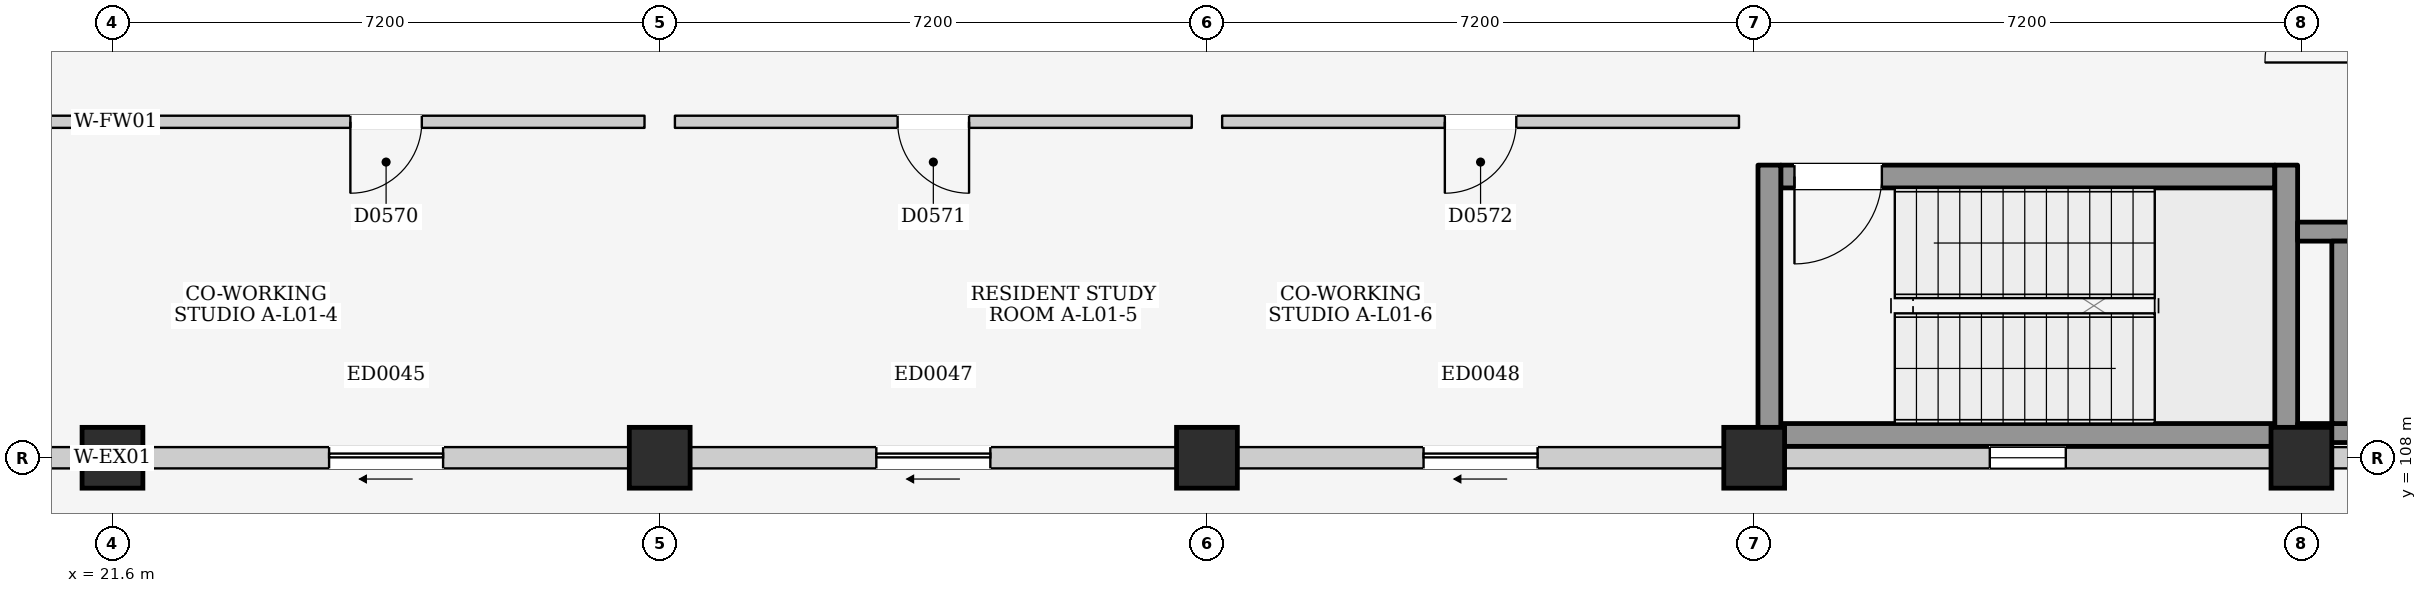
"""IFC4 building model, lengths in metres.
Left out: names, types, materials, properties, quantities, classifications, styles, units other than length and angle.
Written with IfcOpenShell. Run it as: python <this file> out.ifc"""

import sys

from ifc_helpers import new_model, si_unit, direction, frame, frame_2d, origin, origin_2d, place, context, subcontext, project, spatial, rectangle, extrude, element, fill, save


model = new_model("IFC4")
c1 = context("Model", 3, precision=1e-05, world=origin(), true_north=direction((0.0, 1.0)))
c2 = subcontext(c1, "Body", "Model", "MODEL_VIEW")
j1 = project(units=[si_unit("LENGTHUNIT", "METRE"), si_unit("PLANEANGLEUNIT", "RADIAN")], contexts=[c1])
p1 = place(None, origin())
s1 = spatial("IfcSite", under=j1, at=p1, CompositionType="ELEMENT")
p2 = place(p1, origin())
s2 = spatial("IfcBuilding", under=s1, at=p2, CompositionType="ELEMENT")
p3 = place(p2, frame((0.0, 0.0, 4.5)))
s3 = spatial("IfcBuildingStorey", under=s2, at=p3, CompositionType="ELEMENT", Elevation=4.5)
for number, where, z_axis, x_axis in (
    (1, (21.6, 108.0, 0.0), (0.0, 0.0, 1.0), (1.0, 0.0, 0.0)),
    (2, (28.8, 108.0, 0.0), (0.0, 0.0, 1.0), (1.0, 0.0, 0.0)),
    (3, (36.0, 108.0, 0.0), (0.0, 0.0, 1.0), (1.0, 0.0, 0.0)),
    (4, (43.2, 108.0, 0.0), (0.0, 0.0, 1.0), (1.0, 0.0, 0.0)),
    (5, (50.4, 108.0, 0.0), (0.0, 0.0, 1.0), (1.0, 0.0, 0.0)),
):
    element("IfcColumn", number, at=place(p3, frame(where, z_axis=z_axis, x_axis=x_axis)), inside=s3, PredefinedType="COLUMN", context=c2, shape_type="SweptSolid", body=[
        extrude(rectangle(XDim=0.8, YDim=0.8, at=origin_2d()), origin(), (0.0, 0.0, 1.0), 4.5),
    ])
p4 = place(p3, frame((14.8, 108.0, 0.0), z_axis=(0.0, 0.0, 1.0), x_axis=(1.0, 0.0, 0.0)))
e6 = element("IfcWall", 6, at=p4, inside=s3, PredefinedType="ELEMENTEDWALL", context=c2, shape_type="SweptSolid", body=[
    extrude(rectangle(XDim=6.4, YDim=0.28, at=frame_2d((3.2, 0.0))), origin(), (0.0, 0.0, 1.0), 3.585),
])
p5 = place(p4, frame((2.45, 0.0, 0.0)))
e7 = element("IfcOpeningElement", 7, at=p5, cuts=e6, PredefinedType="OPENING", context=c2, shape_type="SweptSolid", body=[
    extrude(rectangle(XDim=1.5, YDim=2.12, at=frame_2d((0.75, 1.06))), frame((0.0, 0.155, 0.0), z_axis=(0.0, -1.0, 0.0), x_axis=(1.0, 0.0, 0.0)), (0.0, 0.0, 1.0), 0.31),
])
p6 = place(p3, frame((22.0, 108.0, 0.0), z_axis=(0.0, 0.0, 1.0), x_axis=(1.0, 0.0, 0.0)))
e8 = element("IfcWall", 8, at=p6, inside=s3, PredefinedType="ELEMENTEDWALL", context=c2, shape_type="SweptSolid", body=[
    extrude(rectangle(XDim=6.4, YDim=0.28, at=frame_2d((3.2, 0.0))), origin(), (0.0, 0.0, 1.0), 3.585),
])
p7 = place(p6, frame((2.45, 0.0, 0.0)))
e9 = element("IfcOpeningElement", 9, at=p7, cuts=e8, PredefinedType="OPENING", context=c2, shape_type="SweptSolid", body=[
    extrude(rectangle(XDim=1.5, YDim=2.12, at=frame_2d((0.75, 1.06))), frame((0.0, 0.155, 0.0), z_axis=(0.0, -1.0, 0.0), x_axis=(1.0, 0.0, 0.0)), (0.0, 0.0, 1.0), 0.31),
])
p8 = place(p3, frame((29.2, 108.0, 0.0), z_axis=(0.0, 0.0, 1.0), x_axis=(1.0, 0.0, 0.0)))
e10 = element("IfcWall", 10, at=p8, inside=s3, PredefinedType="ELEMENTEDWALL", context=c2, shape_type="SweptSolid", body=[
    extrude(rectangle(XDim=6.4, YDim=0.28, at=frame_2d((3.2, 0.0))), origin(), (0.0, 0.0, 1.0), 3.585),
])
p9 = place(p8, frame((2.45, 0.0, 0.0)))
e11 = element("IfcOpeningElement", 11, at=p9, cuts=e10, PredefinedType="OPENING", context=c2, shape_type="SweptSolid", body=[
    extrude(rectangle(XDim=1.5, YDim=2.12, at=frame_2d((0.75, 1.06))), frame((0.0, 0.155, 0.0), z_axis=(0.0, -1.0, 0.0), x_axis=(1.0, 0.0, 0.0)), (0.0, 0.0, 1.0), 0.31),
])
p10 = place(p3, frame((36.4, 108.0, 0.0), z_axis=(0.0, 0.0, 1.0), x_axis=(1.0, 0.0, 0.0)))
e12 = element("IfcWall", 12, at=p10, inside=s3, PredefinedType="ELEMENTEDWALL", context=c2, shape_type="SweptSolid", body=[
    extrude(rectangle(XDim=6.4, YDim=0.28, at=frame_2d((3.2, 0.0))), origin(), (0.0, 0.0, 1.0), 3.585),
])
p11 = place(p10, frame((2.45, 0.0, 0.0)))
e13 = element("IfcOpeningElement", 13, at=p11, cuts=e12, PredefinedType="OPENING", context=c2, shape_type="SweptSolid", body=[
    extrude(rectangle(XDim=1.5, YDim=2.12, at=frame_2d((0.75, 1.06))), frame((0.0, 0.155, 0.0), z_axis=(0.0, -1.0, 0.0), x_axis=(1.0, 0.0, 0.0)), (0.0, 0.0, 1.0), 0.31),
])
p12 = place(p3, frame((43.6, 108.0, 0.0), z_axis=(0.0, 0.0, 1.0), x_axis=(1.0, 0.0, 0.0)))
e14 = element("IfcWall", 14, at=p12, inside=s3, PredefinedType="ELEMENTEDWALL", context=c2, shape_type="SweptSolid", body=[
    extrude(rectangle(XDim=6.4, YDim=0.28, at=frame_2d((3.2, 0.0))), origin(), (0.0, 0.0, 1.0), 3.585),
])
p13 = place(p12, frame((2.7, 0.0, 1.2)))
e15 = element("IfcOpeningElement", 15, at=p13, cuts=e14, PredefinedType="OPENING", context=c2, shape_type="SweptSolid", body=[
    extrude(rectangle(XDim=1.0, YDim=0.9, at=frame_2d((0.5, 0.45))), frame((0.0, 0.155, 0.0), z_axis=(0.0, -1.0, 0.0), x_axis=(1.0, 0.0, 0.0)), (0.0, 0.0, 1.0), 0.31),
])
p14 = place(p3, frame((50.8, 108.0, 0.0), z_axis=(0.0, 0.0, 1.0), x_axis=(1.0, 0.0, 0.0)))
e16 = element("IfcWall", 16, at=p14, inside=s3, PredefinedType="ELEMENTEDWALL", context=c2, shape_type="SweptSolid", body=[
    extrude(rectangle(XDim=6.4, YDim=0.28, at=frame_2d((3.2, 0.0))), origin(), (0.0, 0.0, 1.0), 3.585),
])
p15 = place(p14, frame((2.7, 0.0, 1.2)))
e17 = element("IfcOpeningElement", 17, at=p15, cuts=e16, PredefinedType="OPENING", context=c2, shape_type="SweptSolid", body=[
    extrude(rectangle(XDim=1.0, YDim=0.9, at=frame_2d((0.5, 0.45))), frame((0.0, 0.155, 0.0), z_axis=(0.0, -1.0, 0.0), x_axis=(1.0, 0.0, 0.0)), (0.0, 0.0, 1.0), 0.31),
])
p16 = place(p3, frame((43.55, 108.3, 0.0), z_axis=(0.0, 0.0, 1.0), x_axis=(1.0, 0.0, 0.0)))
e18 = element("IfcWall", 18, at=p16, inside=s3, PredefinedType="SHEAR", context=c2, shape_type="SweptSolid", body=[
    extrude(rectangle(XDim=6.5, YDim=0.3, at=frame_2d((3.25, 0.0))), origin(), (0.0, 0.0, 1.0), 4.25),
])
p17 = place(p3, frame((43.55, 111.7, 0.0), z_axis=(0.0, 0.0, 1.0), x_axis=(1.0, 0.0, 0.0)))
e19 = element("IfcWall", 19, at=p17, inside=s3, PredefinedType="SHEAR", context=c2, shape_type="SweptSolid", body=[
    extrude(rectangle(XDim=6.5, YDim=0.3, at=frame_2d((3.25, 0.0))), origin(), (0.0, 0.0, 1.0), 4.25),
])
p18 = place(p17, frame((0.18, 0.0, 0.0)))
e20 = element("IfcOpeningElement", 20, at=p18, cuts=e19, PredefinedType="OPENING", context=c2, shape_type="SweptSolid", body=[
    extrude(rectangle(XDim=1.15, YDim=2.2, at=frame_2d((0.575, 1.1))), frame((0.0, 0.165, 0.0), z_axis=(0.0, -1.0, 0.0), x_axis=(1.0, 0.0, 0.0)), (0.0, 0.0, 1.0), 0.33),
])
for number, where, z_axis, x_axis in (
    (21, (43.4, 108.15, 0.0), (0.0, 0.0, 1.0), (0.0, 1.0, 0.0)),
    (22, (50.2, 108.15, 0.0), (0.0, 0.0, 1.0), (0.0, 1.0, 0.0)),
):
    element("IfcWall", number, at=place(p3, frame(where, z_axis=z_axis, x_axis=x_axis)), inside=s3, PredefinedType="SHEAR", context=c2, shape_type="SweptSolid", body=[
        extrude(rectangle(XDim=3.7, YDim=0.3, at=frame_2d((1.85, 0.0))), origin(), (0.0, 0.0, 1.0), 4.25),
    ])
p19 = place(p3, frame((50.35, 108.325, 0.0), z_axis=(0.0, 0.0, 1.0), x_axis=(1.0, 0.0, 0.0)))
e23 = element("IfcWall", 23, at=p19, inside=s3, PredefinedType="SHEAR", context=c2, shape_type="SweptSolid", body=[
    extrude(rectangle(XDim=2.675, YDim=0.25, at=frame_2d((1.337, 0.0))), origin(), (0.0, 0.0, 1.0), 4.25),
])
p20 = place(p3, frame((50.35, 110.975, 0.0), z_axis=(0.0, 0.0, 1.0), x_axis=(1.0, 0.0, 0.0)))
e24 = element("IfcWall", 24, at=p20, inside=s3, PredefinedType="SHEAR", context=c2, shape_type="SweptSolid", body=[
    extrude(rectangle(XDim=2.675, YDim=0.25, at=frame_2d((1.337, 0.0))), origin(), (0.0, 0.0, 1.0), 4.25),
])
p21 = place(p20, frame((1.0, 0.0, 0.0)))
e25 = element("IfcOpeningElement", 25, at=p21, cuts=e24, PredefinedType="OPENING", context=c2, shape_type="SweptSolid", body=[
    extrude(rectangle(XDim=1.2, YDim=2.25, at=frame_2d((0.6, 1.125))), frame((0.0, 0.14, 0.0), z_axis=(0.0, -1.0, 0.0), x_axis=(1.0, 0.0, 0.0)), (0.0, 0.0, 1.0), 0.28),
])
p22 = place(p3, frame((50.925, 108.45, 0.0), z_axis=(0.0, 0.0, 1.0), x_axis=(0.0, 1.0, 0.0)))
e26 = element("IfcWall", 26, at=p22, inside=s3, PredefinedType="SHEAR", context=c2, shape_type="SweptSolid", body=[
    extrude(rectangle(XDim=2.4, YDim=0.25, at=frame_2d((1.2, 0.0))), origin(), (0.0, 0.0, 1.0), 4.25),
])
p23 = place(p3, frame((14.6, 112.42, 0.0), z_axis=(0.0, 0.0, 1.0), x_axis=(1.0, 0.0, 0.0)))
e27 = element("IfcWall", 27, at=p23, inside=s3, PredefinedType="PARTITIONING", context=c2, shape_type="SweptSolid", body=[
    extrude(rectangle(XDim=6.8, YDim=0.16, at=frame_2d((3.4, 0.0))), origin(), (0.0, 0.0, 1.0), 4.25),
])
p24 = place(p23, frame((2.93, 0.0, 0.0)))
e28 = element("IfcOpeningElement", 28, at=p24, cuts=e27, PredefinedType="OPENING", context=c2, shape_type="SweptSolid", body=[
    extrude(rectangle(XDim=0.94, YDim=2.12, at=frame_2d((0.47, 1.06))), frame((0.0, 0.095, 0.0), z_axis=(0.0, -1.0, 0.0), x_axis=(1.0, 0.0, 0.0)), (0.0, 0.0, 1.0), 0.19),
])
p25 = place(p3, frame((21.8, 112.42, 0.0), z_axis=(0.0, 0.0, 1.0), x_axis=(1.0, 0.0, 0.0)))
e29 = element("IfcWall", 29, at=p25, inside=s3, PredefinedType="PARTITIONING", context=c2, shape_type="SweptSolid", body=[
    extrude(rectangle(XDim=6.8, YDim=0.16, at=frame_2d((3.4, 0.0))), origin(), (0.0, 0.0, 1.0), 4.25),
])
p26 = place(p25, frame((2.93, 0.0, 0.0)))
e30 = element("IfcOpeningElement", 30, at=p26, cuts=e29, PredefinedType="OPENING", context=c2, shape_type="SweptSolid", body=[
    extrude(rectangle(XDim=0.94, YDim=2.12, at=frame_2d((0.47, 1.06))), frame((0.0, 0.095, 0.0), z_axis=(0.0, -1.0, 0.0), x_axis=(1.0, 0.0, 0.0)), (0.0, 0.0, 1.0), 0.19),
])
p27 = place(p3, frame((29.0, 112.42, 0.0), z_axis=(0.0, 0.0, 1.0), x_axis=(1.0, 0.0, 0.0)))
e31 = element("IfcWall", 31, at=p27, inside=s3, PredefinedType="PARTITIONING", context=c2, shape_type="SweptSolid", body=[
    extrude(rectangle(XDim=6.8, YDim=0.16, at=frame_2d((3.4, 0.0))), origin(), (0.0, 0.0, 1.0), 4.25),
])
p28 = place(p27, frame((2.93, 0.0, 0.0)))
e32 = element("IfcOpeningElement", 32, at=p28, cuts=e31, PredefinedType="OPENING", context=c2, shape_type="SweptSolid", body=[
    extrude(rectangle(XDim=0.94, YDim=2.12, at=frame_2d((0.47, 1.06))), frame((0.0, 0.095, 0.0), z_axis=(0.0, -1.0, 0.0), x_axis=(1.0, 0.0, 0.0)), (0.0, 0.0, 1.0), 0.19),
])
p29 = place(p3, frame((36.2, 112.42, 0.0), z_axis=(0.0, 0.0, 1.0), x_axis=(1.0, 0.0, 0.0)))
e33 = element("IfcWall", 33, at=p29, inside=s3, PredefinedType="PARTITIONING", context=c2, shape_type="SweptSolid", body=[
    extrude(rectangle(XDim=6.8, YDim=0.16, at=frame_2d((3.4, 0.0))), origin(), (0.0, 0.0, 1.0), 4.25),
])
p30 = place(p29, frame((2.93, 0.0, 0.0)))
e34 = element("IfcOpeningElement", 34, at=p30, cuts=e33, PredefinedType="OPENING", context=c2, shape_type="SweptSolid", body=[
    extrude(rectangle(XDim=0.94, YDim=2.12, at=frame_2d((0.47, 1.06))), frame((0.0, 0.095, 0.0), z_axis=(0.0, -1.0, 0.0), x_axis=(1.0, 0.0, 0.0)), (0.0, 0.0, 1.0), 0.19),
])
p31 = place(p7, frame((1.5, 0.0, 0.0), z_axis=(0.0, 0.0, 1.0), x_axis=(-1.0, 0.0, 0.0)))
e35 = element("IfcDoor", 35, at=p31, inside=s3, OperationType="SLIDING_TO_LEFT", PredefinedType="DOOR", context=c2, shape_type="SweptSolid", body=[
    extrude(rectangle(XDim=1.5, YDim=2.12, at=frame_2d((0.75, 1.06))), frame((0.0, 0.025, 0.0), z_axis=(0.0, -1.0, 0.0), x_axis=(1.0, 0.0, 0.0)), (0.0, 0.0, 1.0), 0.05),
])
fill(e9, e35)
p32 = place(p9, frame((1.5, 0.0, 0.0), z_axis=(0.0, 0.0, 1.0), x_axis=(-1.0, 0.0, 0.0)))
e36 = element("IfcDoor", 36, at=p32, inside=s3, OperationType="SLIDING_TO_LEFT", PredefinedType="DOOR", context=c2, shape_type="SweptSolid", body=[
    extrude(rectangle(XDim=1.5, YDim=2.12, at=frame_2d((0.75, 1.06))), frame((0.0, 0.025, 0.0), z_axis=(0.0, -1.0, 0.0), x_axis=(1.0, 0.0, 0.0)), (0.0, 0.0, 1.0), 0.05),
])
fill(e11, e36)
p33 = place(p11, frame((1.5, 0.0, 0.0), z_axis=(0.0, 0.0, 1.0), x_axis=(-1.0, 0.0, 0.0)))
e37 = element("IfcDoor", 37, at=p33, inside=s3, OperationType="SLIDING_TO_LEFT", PredefinedType="DOOR", context=c2, shape_type="SweptSolid", body=[
    extrude(rectangle(XDim=1.5, YDim=2.12, at=frame_2d((0.75, 1.06))), frame((0.0, 0.025, 0.0), z_axis=(0.0, -1.0, 0.0), x_axis=(1.0, 0.0, 0.0)), (0.0, 0.0, 1.0), 0.05),
])
fill(e13, e37)
p34 = place(p13, origin())
e38 = element("IfcWindow", 38, at=p34, inside=s3, PartitioningType="SINGLE_PANEL", PredefinedType="WINDOW", context=c2, shape_type="SweptSolid", body=[
    extrude(rectangle(XDim=1.0, YDim=0.9, at=frame_2d((0.5, 0.45))), frame((0.0, 0.03, 0.0), z_axis=(0.0, -1.0, 0.0), x_axis=(1.0, 0.0, 0.0)), (0.0, 0.0, 1.0), 0.06),
])
fill(e15, e38)
p35 = place(p18, frame((1.15, 0.0, 0.0), z_axis=(0.0, 0.0, 1.0), x_axis=(-1.0, 0.0, 0.0)))
e39 = element("IfcDoor", 39, at=p35, inside=s3, OperationType="SINGLE_SWING_RIGHT", PredefinedType="DOOR", context=c2, shape_type="SweptSolid", body=[
    extrude(rectangle(XDim=1.15, YDim=2.2, at=frame_2d((0.575, 1.1))), frame((0.0, 0.025, 0.0), z_axis=(0.0, -1.0, 0.0), x_axis=(1.0, 0.0, 0.0)), (0.0, 0.0, 1.0), 0.05),
])
fill(e20, e39)
p36 = place(p26, frame((0.94, 0.0, 0.0), z_axis=(0.0, 0.0, 1.0), x_axis=(-1.0, 0.0, 0.0)))
e40 = element("IfcDoor", 40, at=p36, inside=s3, OperationType="SINGLE_SWING_RIGHT", PredefinedType="DOOR", context=c2, shape_type="SweptSolid", body=[
    extrude(rectangle(XDim=0.94, YDim=2.12, at=frame_2d((0.47, 1.06))), frame((0.0, 0.025, 0.0), z_axis=(0.0, -1.0, 0.0), x_axis=(1.0, 0.0, 0.0)), (0.0, 0.0, 1.0), 0.05),
])
fill(e30, e40)
p37 = place(p28, frame((0.94, 0.0, 0.0), z_axis=(0.0, 0.0, 1.0), x_axis=(-1.0, 0.0, 0.0)))
e41 = element("IfcDoor", 41, at=p37, inside=s3, OperationType="SINGLE_SWING_LEFT", PredefinedType="DOOR", context=c2, shape_type="SweptSolid", body=[
    extrude(rectangle(XDim=0.94, YDim=2.12, at=frame_2d((0.47, 1.06))), frame((0.0, 0.025, 0.0), z_axis=(0.0, -1.0, 0.0), x_axis=(1.0, 0.0, 0.0)), (0.0, 0.0, 1.0), 0.05),
])
fill(e32, e41)
p38 = place(p30, frame((0.94, 0.0, 0.0), z_axis=(0.0, 0.0, 1.0), x_axis=(-1.0, 0.0, 0.0)))
e42 = element("IfcDoor", 42, at=p38, inside=s3, OperationType="SINGLE_SWING_RIGHT", PredefinedType="DOOR", context=c2, shape_type="SweptSolid", body=[
    extrude(rectangle(XDim=0.94, YDim=2.12, at=frame_2d((0.47, 1.06))), frame((0.0, 0.025, 0.0), z_axis=(0.0, -1.0, 0.0), x_axis=(1.0, 0.0, 0.0)), (0.0, 0.0, 1.0), 0.05),
])
fill(e34, e42)
save(model, sys.argv[1])
